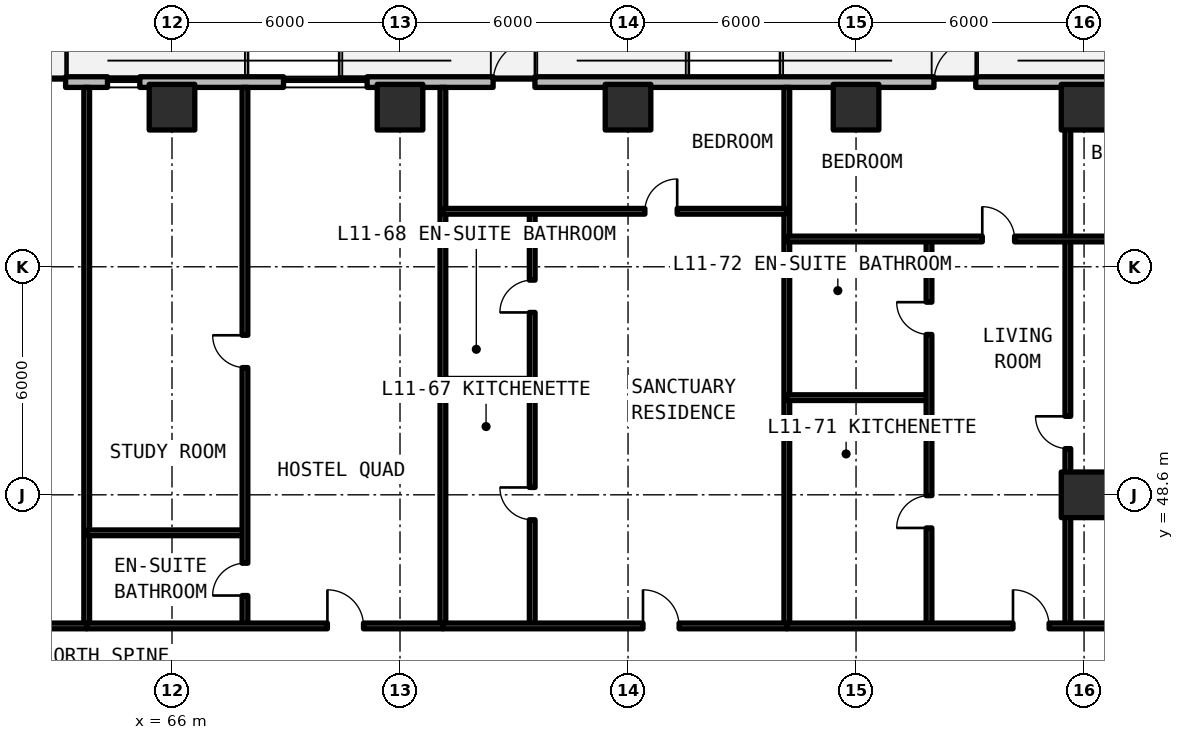
"""IFC4 building model, lengths in metres.
Left out: names, types, materials, properties, quantities, classifications, styles, units other than length and angle.
Written with IfcOpenShell. Run it as: python <this file> out.ifc"""

import sys

from ifc_helpers import new_model, si_unit, direction, frame, frame_2d, origin, origin_2d, place, context, subcontext, project, spatial, rectangle, extrude, element, fill, save


model = new_model("IFC4")
c1 = context("Model", 3, precision=1e-05, world=origin(), true_north=direction((0.0, 1.0)))
c2 = subcontext(c1, "Body", "Model", "MODEL_VIEW")
j1 = project(units=[si_unit("LENGTHUNIT", "METRE"), si_unit("PLANEANGLEUNIT", "RADIAN")], contexts=[c1])
p1 = place(None, origin())
s1 = spatial("IfcSite", under=j1, at=p1, CompositionType="ELEMENT")
p2 = place(p1, origin())
s2 = spatial("IfcBuilding", under=s1, at=p2, CompositionType="ELEMENT")
p3 = place(p2, frame((0.0, 0.0, 42.24)))
s3 = spatial("IfcBuildingStorey", under=s2, at=p3, CompositionType="ELEMENT", Elevation=42.24)
for number, where, z_axis, x_axis in (
    (1, (90.0, 48.6, 0.0), (0.0, 0.0, 1.0), (1.0, 0.0, 0.0)),
    (2, (66.0, 58.8, 0.0), (0.0, 0.0, 1.0), (1.0, 0.0, 0.0)),
    (3, (72.0, 58.8, 0.0), (0.0, 0.0, 1.0), (1.0, 0.0, 0.0)),
    (4, (78.0, 58.8, 0.0), (0.0, 0.0, 1.0), (1.0, 0.0, 0.0)),
    (5, (84.0, 58.8, 0.0), (0.0, 0.0, 1.0), (1.0, 0.0, 0.0)),
    (6, (90.0, 58.8, 0.0), (0.0, 0.0, 1.0), (1.0, 0.0, 0.0)),
):
    element("IfcColumn", number, at=place(p3, frame(where, z_axis=z_axis, x_axis=x_axis)), inside=s3, PredefinedType="COLUMN", context=c2, shape_type="SweptSolid", body=[
        extrude(rectangle(XDim=1.2, YDim=1.2, at=origin_2d()), origin(), (0.0, 0.0, 1.0), 3.3),
    ])
p4 = place(p3, frame((96.542, 59.46, 0.0), z_axis=(0.0, 0.0, 1.0), x_axis=(-1.0, 0.0, 0.0)))
e7 = element("IfcWall", 7, at=p4, inside=s3, PredefinedType="SOLIDWALL", context=c2, shape_type="SweptSolid", body=[
    extrude(rectangle(XDim=44.402, YDim=0.28, at=frame_2d((22.201, 0.0))), origin(), (0.0, 0.0, 1.0), 3.08),
])
p5 = place(p4, frame((33.342, 0.0, 0.0)))
e8 = element("IfcOpeningElement", 8, at=p5, cuts=e7, PredefinedType="OPENING", context=c2, shape_type="SweptSolid", body=[
    extrude(rectangle(XDim=1.1, YDim=2.15, at=frame_2d((0.55, 1.075))), frame((0.0, 0.15, 0.0), z_axis=(0.0, -1.0, 0.0), x_axis=(1.0, 0.0, 0.0)), (0.0, 0.0, 1.0), 0.3),
])
p6 = place(p4, frame((20.992, 0.0, 0.0)))
e9 = element("IfcOpeningElement", 9, at=p6, cuts=e7, PredefinedType="OPENING", context=c2, shape_type="SweptSolid", body=[
    extrude(rectangle(XDim=1.1, YDim=2.15, at=frame_2d((0.55, 1.075))), frame((0.0, 0.15, 0.0), z_axis=(0.0, -1.0, 0.0), x_axis=(1.0, 0.0, 0.0)), (0.0, 0.0, 1.0), 0.3),
])
p7 = place(p4, frame((9.392, 0.0, 0.0)))
e10 = element("IfcOpeningElement", 10, at=p7, cuts=e7, PredefinedType="OPENING", context=c2, shape_type="SweptSolid", body=[
    extrude(rectangle(XDim=1.1, YDim=2.15, at=frame_2d((0.55, 1.075))), frame((0.0, 0.15, 0.0), z_axis=(0.0, -1.0, 0.0), x_axis=(1.0, 0.0, 0.0)), (0.0, 0.0, 1.0), 0.3),
])
p8 = place(p4, frame((31.389, 0.0, 0.78)))
e11 = element("IfcOpeningElement", 11, at=p8, cuts=e7, PredefinedType="OPENING", context=c2, shape_type="SweptSolid", body=[
    extrude(rectangle(XDim=0.85, YDim=1.65, at=frame_2d((0.425, 0.825))), frame((0.0, 0.15, 0.0), z_axis=(0.0, -1.0, 0.0), x_axis=(1.0, 0.0, 0.0)), (0.0, 0.0, 1.0), 0.3),
])
p9 = place(p4, frame((25.408, 0.0, 0.78)))
e12 = element("IfcOpeningElement", 12, at=p9, cuts=e7, PredefinedType="OPENING", context=c2, shape_type="SweptSolid", body=[
    extrude(rectangle(XDim=2.2, YDim=1.66, at=frame_2d((1.1, 0.83))), frame((0.0, 0.15, 0.0), z_axis=(0.0, -1.0, 0.0), x_axis=(1.0, 0.0, 0.0)), (0.0, 0.0, 1.0), 0.3),
])
p10 = place(p4, frame((2.465, 0.0, 0.78)))
e13 = element("IfcOpeningElement", 13, at=p10, cuts=e7, PredefinedType="OPENING", context=c2, shape_type="SweptSolid", body=[
    extrude(rectangle(XDim=2.2, YDim=1.66, at=frame_2d((1.1, 0.83))), frame((0.0, 0.15, 0.0), z_axis=(0.0, -1.0, 0.0), x_axis=(1.0, 0.0, 0.0)), (0.0, 0.0, 1.0), 0.3),
])
p11 = place(p3, frame((63.756, 45.15, 0.0), z_axis=(0.0, 0.0, 1.0), x_axis=(0.0, 1.0, 0.0)))
e14 = element("IfcWall", 14, at=p11, inside=s3, PredefinedType="SOLIDWALL", context=c2, shape_type="SweptSolid", body=[
    extrude(rectangle(XDim=14.17, YDim=0.15, at=frame_2d((7.085, 0.0))), origin(), (0.0, 0.0, 1.0), 2.35),
])
p12 = place(p3, frame((52.12, 45.15, 0.0), z_axis=(0.0, 0.0, 1.0), x_axis=(1.0, 0.0, 0.0)))
e15 = element("IfcWall", 15, at=p12, inside=s3, PredefinedType="SOLIDWALL", context=c2, shape_type="SweptSolid", body=[
    extrude(rectangle(XDim=11.635, YDim=0.15, at=frame_2d((5.818, 0.0))), origin(), (0.0, 0.0, 1.0), 2.35),
])
p13 = place(p12, frame((5.268, 0.0, 0.0)))
e16 = element("IfcOpeningElement", 16, at=p13, cuts=e15, PredefinedType="OPENING", context=c2, shape_type="SweptSolid", body=[
    extrude(rectangle(XDim=1.1, YDim=2.15, at=frame_2d((0.55, 1.075))), frame((0.0, 0.085, 0.0), z_axis=(0.0, -1.0, 0.0), x_axis=(1.0, 0.0, 0.0)), (0.0, 0.0, 1.0), 0.17),
])
p14 = place(p3, frame((73.129, 45.15, 0.0), z_axis=(0.0, 0.0, 1.0), x_axis=(0.0, 1.0, 0.0)))
e17 = element("IfcWall", 17, at=p14, inside=s3, PredefinedType="SOLIDWALL", context=c2, shape_type="SweptSolid", body=[
    extrude(rectangle(XDim=14.17, YDim=0.15, at=frame_2d((7.085, 0.0))), origin(), (0.0, 0.0, 1.0), 2.35),
])
p15 = place(p3, frame((63.756, 47.6, 0.0), z_axis=(0.0, 0.0, 1.0), x_axis=(1.0, 0.0, 0.0)))
e18 = element("IfcWall", 18, at=p15, inside=s3, PredefinedType="PARTITIONING", context=c2, shape_type="SweptSolid", body=[
    extrude(rectangle(XDim=4.164, YDim=0.15, at=frame_2d((2.082, 0.0))), origin(), (0.0, 0.0, 1.0), 2.35),
])
p16 = place(p3, frame((67.92, 45.15, 0.0), z_axis=(0.0, 0.0, 1.0), x_axis=(0.0, 1.0, 0.0)))
e19 = element("IfcWall", 19, at=p16, inside=s3, PredefinedType="PARTITIONING", context=c2, shape_type="SweptSolid", body=[
    extrude(rectangle(XDim=14.17, YDim=0.15, at=frame_2d((7.085, 0.0))), origin(), (0.0, 0.0, 1.0), 2.35),
])
p17 = place(p16, frame((0.8, 0.0, 0.0)))
e20 = element("IfcOpeningElement", 20, at=p17, cuts=e19, PredefinedType="OPENING", context=c2, shape_type="SweptSolid", body=[
    extrude(rectangle(XDim=0.85, YDim=2.1, at=frame_2d((0.425, 1.05))), frame((0.0, 0.085, 0.0), z_axis=(0.0, -1.0, 0.0), x_axis=(1.0, 0.0, 0.0)), (0.0, 0.0, 1.0), 0.17),
])
p18 = place(p16, frame((6.798, 0.0, 0.0)))
e21 = element("IfcOpeningElement", 21, at=p18, cuts=e19, PredefinedType="OPENING", context=c2, shape_type="SweptSolid", body=[
    extrude(rectangle(XDim=0.85, YDim=2.1, at=frame_2d((0.425, 1.05))), frame((0.0, 0.085, 0.0), z_axis=(0.0, -1.0, 0.0), x_axis=(1.0, 0.0, 0.0)), (0.0, 0.0, 1.0), 0.17),
])
p19 = place(p3, frame((63.756, 45.15, 0.0), z_axis=(0.0, 0.0, 1.0), x_axis=(1.0, 0.0, 0.0)))
e22 = element("IfcWall", 22, at=p19, inside=s3, PredefinedType="SOLIDWALL", context=c2, shape_type="SweptSolid", body=[
    extrude(rectangle(XDim=9.373, YDim=0.15, at=frame_2d((4.687, 0.0))), origin(), (0.0, 0.0, 1.0), 2.35),
])
p20 = place(p19, frame((6.334, 0.0, 0.0)))
e23 = element("IfcOpeningElement", 23, at=p20, cuts=e22, PredefinedType="OPENING", context=c2, shape_type="SweptSolid", body=[
    extrude(rectangle(XDim=0.95, YDim=2.15, at=frame_2d((0.475, 1.075))), frame((0.0, 0.085, 0.0), z_axis=(0.0, -1.0, 0.0), x_axis=(1.0, 0.0, 0.0)), (0.0, 0.0, 1.0), 0.17),
])
p21 = place(p3, frame((82.179, 45.15, 0.0), z_axis=(0.0, 0.0, 1.0), x_axis=(0.0, 1.0, 0.0)))
e24 = element("IfcWall", 24, at=p21, inside=s3, PredefinedType="SOLIDWALL", context=c2, shape_type="SweptSolid", body=[
    extrude(rectangle(XDim=14.17, YDim=0.15, at=frame_2d((7.085, 0.0))), origin(), (0.0, 0.0, 1.0), 2.35),
])
p22 = place(p3, frame((73.129, 51.587, 0.0), z_axis=(0.0, 0.0, 1.0), x_axis=(1.0, 0.0, 0.0)))
e25 = element("IfcWall", 25, at=p22, inside=s3, PredefinedType="PARTITIONING", context=c2, shape_type="SweptSolid", body=[
    extrude(rectangle(XDim=2.35, YDim=0.15, at=frame_2d((1.175, 0.0))), origin(), (0.0, 0.0, 1.0), 2.35),
])
p23 = place(p3, frame((75.479, 45.15, 0.0), z_axis=(0.0, 0.0, 1.0), x_axis=(0.0, 1.0, 0.0)))
e26 = element("IfcWall", 26, at=p23, inside=s3, PredefinedType="PARTITIONING", context=c2, shape_type="SweptSolid", body=[
    extrude(rectangle(XDim=10.91, YDim=0.15, at=frame_2d((5.455, 0.0))), origin(), (0.0, 0.0, 1.0), 2.35),
])
p24 = place(p23, frame((2.794, 0.0, 0.0)))
e27 = element("IfcOpeningElement", 27, at=p24, cuts=e26, PredefinedType="OPENING", context=c2, shape_type="SweptSolid", body=[
    extrude(rectangle(XDim=0.85, YDim=2.1, at=frame_2d((0.425, 1.05))), frame((0.0, 0.085, 0.0), z_axis=(0.0, -1.0, 0.0), x_axis=(1.0, 0.0, 0.0)), (0.0, 0.0, 1.0), 0.17),
])
p25 = place(p23, frame((8.249, 0.0, 0.0)))
e28 = element("IfcOpeningElement", 28, at=p25, cuts=e26, PredefinedType="OPENING", context=c2, shape_type="SweptSolid", body=[
    extrude(rectangle(XDim=0.85, YDim=2.1, at=frame_2d((0.425, 1.05))), frame((0.0, 0.085, 0.0), z_axis=(0.0, -1.0, 0.0), x_axis=(1.0, 0.0, 0.0)), (0.0, 0.0, 1.0), 0.17),
])
p26 = place(p3, frame((73.129, 56.06, 0.0), z_axis=(0.0, 0.0, 1.0), x_axis=(1.0, 0.0, 0.0)))
e29 = element("IfcWall", 29, at=p26, inside=s3, PredefinedType="PARTITIONING", context=c2, shape_type="SweptSolid", body=[
    extrude(rectangle(XDim=9.05, YDim=0.15, at=frame_2d((4.525, 0.0))), origin(), (0.0, 0.0, 1.0), 2.35),
])
p27 = place(p26, frame((5.315, 0.0, 0.0)))
e30 = element("IfcOpeningElement", 30, at=p27, cuts=e29, PredefinedType="OPENING", context=c2, shape_type="SweptSolid", body=[
    extrude(rectangle(XDim=0.85, YDim=2.1, at=frame_2d((0.425, 1.05))), frame((0.0, 0.085, 0.0), z_axis=(0.0, -1.0, 0.0), x_axis=(1.0, 0.0, 0.0)), (0.0, 0.0, 1.0), 0.17),
])
p28 = place(p3, frame((73.129, 45.15, 0.0), z_axis=(0.0, 0.0, 1.0), x_axis=(1.0, 0.0, 0.0)))
e31 = element("IfcWall", 31, at=p28, inside=s3, PredefinedType="SOLIDWALL", context=c2, shape_type="SweptSolid", body=[
    extrude(rectangle(XDim=9.05, YDim=0.15, at=frame_2d((4.525, 0.0))), origin(), (0.0, 0.0, 1.0), 2.35),
])
p29 = place(p28, frame((5.265, 0.0, 0.0)))
e32 = element("IfcOpeningElement", 32, at=p29, cuts=e31, PredefinedType="OPENING", context=c2, shape_type="SweptSolid", body=[
    extrude(rectangle(XDim=0.95, YDim=2.15, at=frame_2d((0.475, 1.075))), frame((0.0, 0.085, 0.0), z_axis=(0.0, -1.0, 0.0), x_axis=(1.0, 0.0, 0.0)), (0.0, 0.0, 1.0), 0.17),
])
p30 = place(p3, frame((89.574, 45.15, 0.0), z_axis=(0.0, 0.0, 1.0), x_axis=(0.0, 1.0, 0.0)))
e33 = element("IfcWall", 33, at=p30, inside=s3, PredefinedType="PARTITIONING", context=c2, shape_type="SweptSolid", body=[
    extrude(rectangle(XDim=10.181, YDim=0.15, at=frame_2d((5.09, 0.0))), origin(), (0.0, 0.0, 1.0), 2.35),
])
p31 = place(p30, frame((4.666, 0.0, 0.0)))
e34 = element("IfcOpeningElement", 34, at=p31, cuts=e33, PredefinedType="OPENING", context=c2, shape_type="SweptSolid", body=[
    extrude(rectangle(XDim=0.85, YDim=2.1, at=frame_2d((0.425, 1.05))), frame((0.0, 0.085, 0.0), z_axis=(0.0, -1.0, 0.0), x_axis=(1.0, 0.0, 0.0)), (0.0, 0.0, 1.0), 0.17),
])
p32 = place(p3, frame((82.179, 51.157, 0.0), z_axis=(0.0, 0.0, 1.0), x_axis=(1.0, 0.0, 0.0)))
e35 = element("IfcWall", 35, at=p32, inside=s3, PredefinedType="PARTITIONING", context=c2, shape_type="SweptSolid", body=[
    extrude(rectangle(XDim=3.741, YDim=0.15, at=frame_2d((1.871, 0.0))), origin(), (0.0, 0.0, 1.0), 2.35),
])
p33 = place(p3, frame((85.92, 45.15, 0.0), z_axis=(0.0, 0.0, 1.0), x_axis=(0.0, 1.0, 0.0)))
e36 = element("IfcWall", 36, at=p33, inside=s3, PredefinedType="PARTITIONING", context=c2, shape_type="SweptSolid", body=[
    extrude(rectangle(XDim=10.181, YDim=0.15, at=frame_2d((5.09, 0.0))), origin(), (0.0, 0.0, 1.0), 2.35),
])
p34 = place(p33, frame((2.578, 0.0, 0.0)))
e37 = element("IfcOpeningElement", 37, at=p34, cuts=e36, PredefinedType="OPENING", context=c2, shape_type="SweptSolid", body=[
    extrude(rectangle(XDim=0.85, YDim=2.1, at=frame_2d((0.425, 1.05))), frame((0.0, 0.085, 0.0), z_axis=(0.0, -1.0, 0.0), x_axis=(1.0, 0.0, 0.0)), (0.0, 0.0, 1.0), 0.17),
])
p35 = place(p33, frame((7.669, 0.0, 0.0)))
e38 = element("IfcOpeningElement", 38, at=p35, cuts=e36, PredefinedType="OPENING", context=c2, shape_type="SweptSolid", body=[
    extrude(rectangle(XDim=0.85, YDim=2.1, at=frame_2d((0.425, 1.05))), frame((0.0, 0.085, 0.0), z_axis=(0.0, -1.0, 0.0), x_axis=(1.0, 0.0, 0.0)), (0.0, 0.0, 1.0), 0.17),
])
p36 = place(p3, frame((89.574, 55.331, 0.0), z_axis=(0.0, 0.0, 1.0), x_axis=(0.0, 1.0, 0.0)))
e39 = element("IfcWall", 39, at=p36, inside=s3, PredefinedType="PARTITIONING", context=c2, shape_type="SweptSolid", body=[
    extrude(rectangle(XDim=3.989, YDim=0.15, at=frame_2d((1.995, 0.0))), origin(), (0.0, 0.0, 1.0), 2.35),
])
p37 = place(p3, frame((82.179, 55.331, 0.0), z_axis=(0.0, 0.0, 1.0), x_axis=(1.0, 0.0, 0.0)))
e40 = element("IfcWall", 40, at=p37, inside=s3, PredefinedType="PARTITIONING", context=c2, shape_type="SweptSolid", body=[
    extrude(rectangle(XDim=14.221, YDim=0.15, at=frame_2d((7.111, 0.0))), origin(), (0.0, 0.0, 1.0), 2.35),
])
p38 = place(p37, frame((5.143, 0.0, 0.0)))
e41 = element("IfcOpeningElement", 41, at=p38, cuts=e40, PredefinedType="OPENING", context=c2, shape_type="SweptSolid", body=[
    extrude(rectangle(XDim=0.85, YDim=2.1, at=frame_2d((0.425, 1.05))), frame((0.0, 0.085, 0.0), z_axis=(0.0, -1.0, 0.0), x_axis=(1.0, 0.0, 0.0)), (0.0, 0.0, 1.0), 0.17),
])
p39 = place(p37, frame((10.383, 0.0, 0.0)))
e42 = element("IfcOpeningElement", 42, at=p39, cuts=e40, PredefinedType="OPENING", context=c2, shape_type="SweptSolid", body=[
    extrude(rectangle(XDim=0.85, YDim=2.1, at=frame_2d((0.425, 1.05))), frame((0.0, 0.085, 0.0), z_axis=(0.0, -1.0, 0.0), x_axis=(1.0, 0.0, 0.0)), (0.0, 0.0, 1.0), 0.17),
])
p40 = place(p3, frame((82.179, 45.15, 0.0), z_axis=(0.0, 0.0, 1.0), x_axis=(1.0, 0.0, 0.0)))
e43 = element("IfcWall", 43, at=p40, inside=s3, PredefinedType="SOLIDWALL", context=c2, shape_type="SweptSolid", body=[
    extrude(rectangle(XDim=14.221, YDim=0.15, at=frame_2d((7.111, 0.0))), origin(), (0.0, 0.0, 1.0), 2.35),
])
p41 = place(p40, frame((5.951, 0.0, 0.0)))
e44 = element("IfcOpeningElement", 44, at=p41, cuts=e43, PredefinedType="OPENING", context=c2, shape_type="SweptSolid", body=[
    extrude(rectangle(XDim=0.95, YDim=2.15, at=frame_2d((0.475, 1.075))), frame((0.0, 0.085, 0.0), z_axis=(0.0, -1.0, 0.0), x_axis=(1.0, 0.0, 0.0)), (0.0, 0.0, 1.0), 0.17),
])
p42 = place(p5, frame((1.1, 0.0, 0.0), z_axis=(0.0, 0.0, 1.0), x_axis=(-1.0, 0.0, 0.0)))
e45 = element("IfcDoor", 45, at=p42, inside=s3, OperationType="SINGLE_SWING_RIGHT", PredefinedType="DOOR", context=c2, shape_type="SweptSolid", body=[
    extrude(rectangle(XDim=1.1, YDim=2.15, at=frame_2d((0.55, 1.075))), frame((0.0, 0.025, 0.0), z_axis=(0.0, -1.0, 0.0), x_axis=(1.0, 0.0, 0.0)), (0.0, 0.0, 1.0), 0.05),
])
fill(e8, e45)
p43 = place(p6, frame((1.1, 0.0, 0.0), z_axis=(0.0, 0.0, 1.0), x_axis=(-1.0, 0.0, 0.0)))
e46 = element("IfcDoor", 46, at=p43, inside=s3, OperationType="SINGLE_SWING_LEFT", PredefinedType="DOOR", context=c2, shape_type="SweptSolid", body=[
    extrude(rectangle(XDim=1.1, YDim=2.15, at=frame_2d((0.55, 1.075))), frame((0.0, 0.025, 0.0), z_axis=(0.0, -1.0, 0.0), x_axis=(1.0, 0.0, 0.0)), (0.0, 0.0, 1.0), 0.05),
])
fill(e9, e46)
p44 = place(p7, frame((1.1, 0.0, 0.0), z_axis=(0.0, 0.0, 1.0), x_axis=(-1.0, 0.0, 0.0)))
e47 = element("IfcDoor", 47, at=p44, inside=s3, OperationType="SINGLE_SWING_RIGHT", PredefinedType="DOOR", context=c2, shape_type="SweptSolid", body=[
    extrude(rectangle(XDim=1.1, YDim=2.15, at=frame_2d((0.55, 1.075))), frame((0.0, 0.025, 0.0), z_axis=(0.0, -1.0, 0.0), x_axis=(1.0, 0.0, 0.0)), (0.0, 0.0, 1.0), 0.05),
])
fill(e10, e47)
p45 = place(p8, origin())
e48 = element("IfcWindow", 48, at=p45, inside=s3, PartitioningType="SINGLE_PANEL", PredefinedType="WINDOW", context=c2, shape_type="SweptSolid", body=[
    extrude(rectangle(XDim=0.85, YDim=1.65, at=frame_2d((0.425, 0.825))), frame((0.0, 0.03, 0.0), z_axis=(0.0, -1.0, 0.0), x_axis=(1.0, 0.0, 0.0)), (0.0, 0.0, 1.0), 0.06),
])
fill(e11, e48)
p46 = place(p9, origin())
e49 = element("IfcWindow", 49, at=p46, inside=s3, PartitioningType="SINGLE_PANEL", PredefinedType="WINDOW", context=c2, shape_type="SweptSolid", body=[
    extrude(rectangle(XDim=2.2, YDim=1.66, at=frame_2d((1.1, 0.83))), frame((0.0, 0.03, 0.0), z_axis=(0.0, -1.0, 0.0), x_axis=(1.0, 0.0, 0.0)), (0.0, 0.0, 1.0), 0.06),
])
fill(e12, e49)
p47 = place(p17, origin())
e50 = element("IfcDoor", 50, at=p47, inside=s3, OperationType="SINGLE_SWING_LEFT", PredefinedType="DOOR", context=c2, shape_type="SweptSolid", body=[
    extrude(rectangle(XDim=0.85, YDim=2.1, at=frame_2d((0.425, 1.05))), frame((0.0, 0.025, 0.0), z_axis=(0.0, -1.0, 0.0), x_axis=(1.0, 0.0, 0.0)), (0.0, 0.0, 1.0), 0.05),
])
fill(e20, e50)
p48 = place(p18, origin())
e51 = element("IfcDoor", 51, at=p48, inside=s3, OperationType="SINGLE_SWING_RIGHT", PredefinedType="DOOR", context=c2, shape_type="SweptSolid", body=[
    extrude(rectangle(XDim=0.85, YDim=2.1, at=frame_2d((0.425, 1.05))), frame((0.0, 0.025, 0.0), z_axis=(0.0, -1.0, 0.0), x_axis=(1.0, 0.0, 0.0)), (0.0, 0.0, 1.0), 0.05),
])
fill(e21, e51)
p49 = place(p20, origin())
e52 = element("IfcDoor", 52, at=p49, inside=s3, OperationType="SINGLE_SWING_LEFT", PredefinedType="DOOR", context=c2, shape_type="SweptSolid", body=[
    extrude(rectangle(XDim=0.95, YDim=2.15, at=frame_2d((0.475, 1.075))), frame((0.0, 0.025, 0.0), z_axis=(0.0, -1.0, 0.0), x_axis=(1.0, 0.0, 0.0)), (0.0, 0.0, 1.0), 0.05),
])
fill(e23, e52)
p50 = place(p24, origin())
e53 = element("IfcDoor", 53, at=p50, inside=s3, OperationType="SINGLE_SWING_RIGHT", PredefinedType="DOOR", context=c2, shape_type="SweptSolid", body=[
    extrude(rectangle(XDim=0.85, YDim=2.1, at=frame_2d((0.425, 1.05))), frame((0.0, 0.025, 0.0), z_axis=(0.0, -1.0, 0.0), x_axis=(1.0, 0.0, 0.0)), (0.0, 0.0, 1.0), 0.05),
])
fill(e27, e53)
p51 = place(p25, origin())
e54 = element("IfcDoor", 54, at=p51, inside=s3, OperationType="SINGLE_SWING_LEFT", PredefinedType="DOOR", context=c2, shape_type="SweptSolid", body=[
    extrude(rectangle(XDim=0.85, YDim=2.1, at=frame_2d((0.425, 1.05))), frame((0.0, 0.025, 0.0), z_axis=(0.0, -1.0, 0.0), x_axis=(1.0, 0.0, 0.0)), (0.0, 0.0, 1.0), 0.05),
])
fill(e28, e54)
p52 = place(p27, origin())
e55 = element("IfcDoor", 55, at=p52, inside=s3, OperationType="SINGLE_SWING_RIGHT", PredefinedType="DOOR", context=c2, shape_type="SweptSolid", body=[
    extrude(rectangle(XDim=0.85, YDim=2.1, at=frame_2d((0.425, 1.05))), frame((0.0, 0.025, 0.0), z_axis=(0.0, -1.0, 0.0), x_axis=(1.0, 0.0, 0.0)), (0.0, 0.0, 1.0), 0.05),
])
fill(e30, e55)
p53 = place(p29, origin())
e56 = element("IfcDoor", 56, at=p53, inside=s3, OperationType="SINGLE_SWING_LEFT", PredefinedType="DOOR", context=c2, shape_type="SweptSolid", body=[
    extrude(rectangle(XDim=0.95, YDim=2.15, at=frame_2d((0.475, 1.075))), frame((0.0, 0.025, 0.0), z_axis=(0.0, -1.0, 0.0), x_axis=(1.0, 0.0, 0.0)), (0.0, 0.0, 1.0), 0.05),
])
fill(e32, e56)
p54 = place(p31, origin())
e57 = element("IfcDoor", 57, at=p54, inside=s3, OperationType="SINGLE_SWING_RIGHT", PredefinedType="DOOR", context=c2, shape_type="SweptSolid", body=[
    extrude(rectangle(XDim=0.85, YDim=2.1, at=frame_2d((0.425, 1.05))), frame((0.0, 0.025, 0.0), z_axis=(0.0, -1.0, 0.0), x_axis=(1.0, 0.0, 0.0)), (0.0, 0.0, 1.0), 0.05),
])
fill(e34, e57)
p55 = place(p34, origin())
e58 = element("IfcDoor", 58, at=p55, inside=s3, OperationType="SINGLE_SWING_LEFT", PredefinedType="DOOR", context=c2, shape_type="SweptSolid", body=[
    extrude(rectangle(XDim=0.85, YDim=2.1, at=frame_2d((0.425, 1.05))), frame((0.0, 0.025, 0.0), z_axis=(0.0, -1.0, 0.0), x_axis=(1.0, 0.0, 0.0)), (0.0, 0.0, 1.0), 0.05),
])
fill(e37, e58)
p56 = place(p35, origin())
e59 = element("IfcDoor", 59, at=p56, inside=s3, OperationType="SINGLE_SWING_RIGHT", PredefinedType="DOOR", context=c2, shape_type="SweptSolid", body=[
    extrude(rectangle(XDim=0.85, YDim=2.1, at=frame_2d((0.425, 1.05))), frame((0.0, 0.025, 0.0), z_axis=(0.0, -1.0, 0.0), x_axis=(1.0, 0.0, 0.0)), (0.0, 0.0, 1.0), 0.05),
])
fill(e38, e59)
p57 = place(p38, origin())
e60 = element("IfcDoor", 60, at=p57, inside=s3, OperationType="SINGLE_SWING_LEFT", PredefinedType="DOOR", context=c2, shape_type="SweptSolid", body=[
    extrude(rectangle(XDim=0.85, YDim=2.1, at=frame_2d((0.425, 1.05))), frame((0.0, 0.025, 0.0), z_axis=(0.0, -1.0, 0.0), x_axis=(1.0, 0.0, 0.0)), (0.0, 0.0, 1.0), 0.05),
])
fill(e41, e60)
p58 = place(p41, origin())
e61 = element("IfcDoor", 61, at=p58, inside=s3, OperationType="SINGLE_SWING_LEFT", PredefinedType="DOOR", context=c2, shape_type="SweptSolid", body=[
    extrude(rectangle(XDim=0.95, YDim=2.15, at=frame_2d((0.475, 1.075))), frame((0.0, 0.025, 0.0), z_axis=(0.0, -1.0, 0.0), x_axis=(1.0, 0.0, 0.0)), (0.0, 0.0, 1.0), 0.05),
])
fill(e44, e61)
save(model, sys.argv[1])
